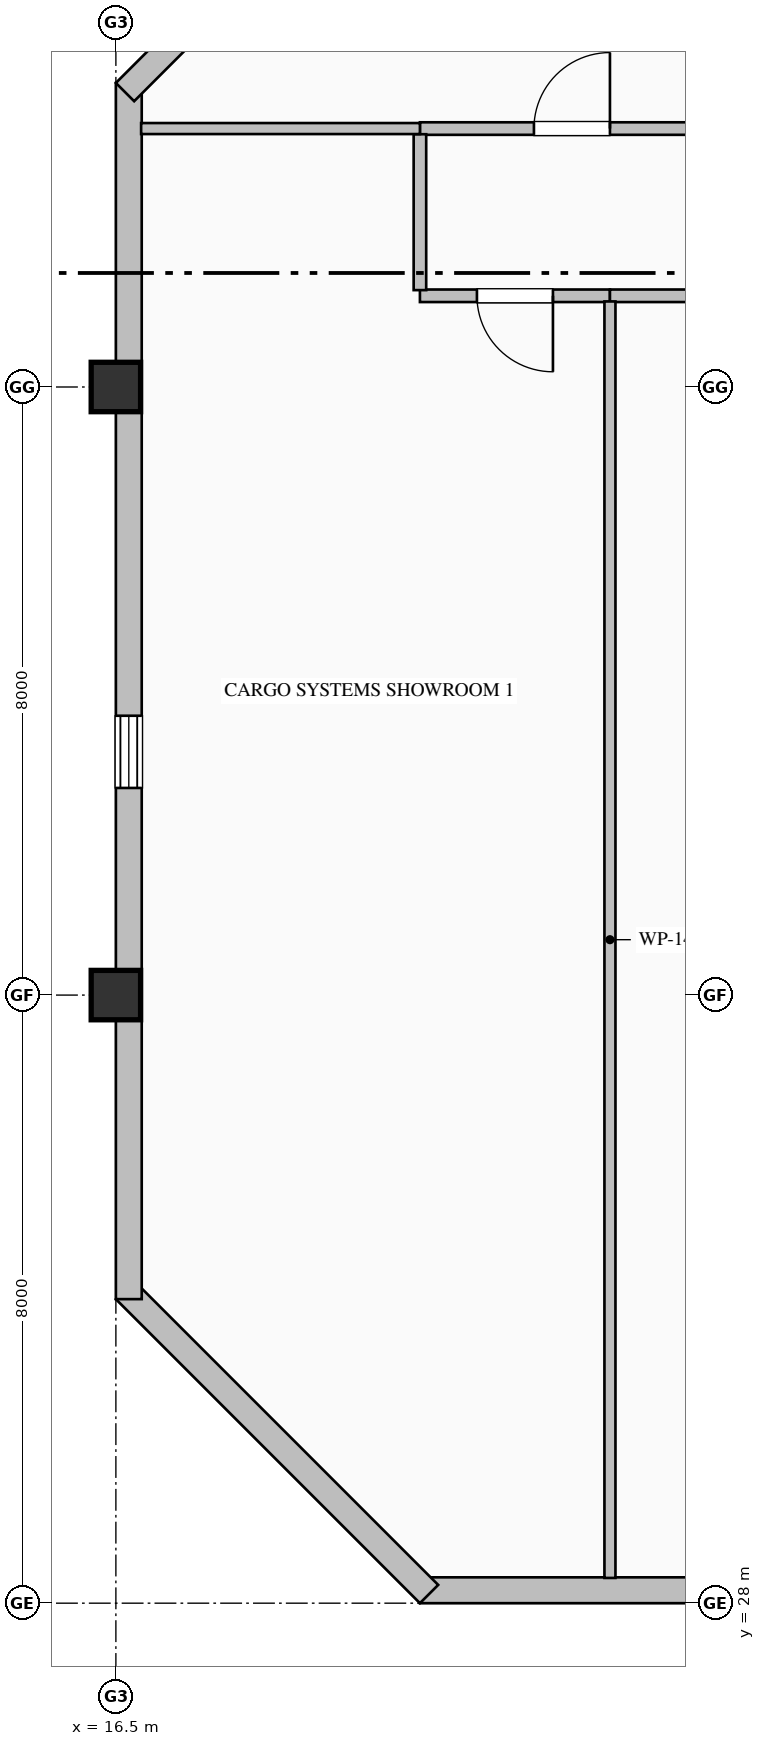
"""IFC4 building model, lengths in metres.
Left out: names, types, materials, properties, quantities, classifications, styles, units other than length and angle.
Written with IfcOpenShell. Run it as: python <this file> out.ifc"""

import sys

from ifc_helpers import new_model, si_unit, direction, frame, frame_2d, origin, origin_2d, place, context, subcontext, project, spatial, rectangle, hollow_rectangle, extrude, element, fill, save


model = new_model("IFC4")
c1 = context("Model", 3, precision=1e-05, world=origin(), true_north=direction((0.0, 1.0)))
c2 = subcontext(c1, "Body", "Model", "MODEL_VIEW")
j1 = project(units=[si_unit("LENGTHUNIT", "METRE"), si_unit("PLANEANGLEUNIT", "RADIAN")], contexts=[c1])
p1 = place(None, origin())
s1 = spatial("IfcSite", under=j1, at=p1, CompositionType="ELEMENT")
p2 = place(p1, origin())
s2 = spatial("IfcBuilding", under=s1, at=p2, CompositionType="ELEMENT")
p3 = place(p2, frame((0.0, 0.0, 355.2)))
s3 = spatial("IfcBuildingStorey", under=s2, at=p3, CompositionType="ELEMENT", Elevation=355.2)
for number, where, z_axis, x_axis in (
    (1, (16.5, 36.0, 0.0), (0.0, 0.0, 1.0), (1.0, 0.0, 0.0)),
    (2, (16.5, 44.0, 0.0), (0.0, 0.0, 1.0), (1.0, 0.0, 0.0)),
):
    element("IfcColumn", number, at=place(p3, frame(where, z_axis=z_axis, x_axis=x_axis)), inside=s3, PredefinedType="COLUMN", context=c2, shape_type="SweptSolid", body=[
        extrude(hollow_rectangle(XDim=0.65, YDim=0.65, WallThickness=0.028, at=origin_2d()), origin(), (0.0, 0.0, 1.0), 4.0),
    ])
p4 = place(p3, frame((40.52, 28.17, 0.0), z_axis=(0.0, 0.0, 1.0), x_axis=(-1.0, 0.0, 0.0)))
e3 = element("IfcWall", 3, at=p4, inside=s3, PredefinedType="SOLIDWALL", context=c2, shape_type="SweptSolid", body=[
    extrude(rectangle(XDim=20.02, YDim=0.34, at=frame_2d((10.01, 0.0))), origin(), (0.0, 0.0, 1.0), 3.185),
])
p5 = place(p4, frame((3.125, 0.0, 0.9)))
e4 = element("IfcOpeningElement", 4, at=p5, cuts=e3, PredefinedType="OPENING", context=c2, shape_type="SweptSolid", body=[
    extrude(rectangle(XDim=0.95, YDim=1.85, at=frame_2d((0.475, 0.925))), frame((0.0, 0.18, 0.0), z_axis=(0.0, -1.0, 0.0), x_axis=(1.0, 0.0, 0.0)), (0.0, 0.0, 1.0), 0.36),
])
p6 = place(p4, frame((13.925, 0.0, 0.9)))
e5 = element("IfcOpeningElement", 5, at=p6, cuts=e3, PredefinedType="OPENING", context=c2, shape_type="SweptSolid", body=[
    extrude(rectangle(XDim=0.95, YDim=1.85, at=frame_2d((0.475, 0.925))), frame((0.0, 0.18, 0.0), z_axis=(0.0, -1.0, 0.0), x_axis=(1.0, 0.0, 0.0)), (0.0, 0.0, 1.0), 0.36),
])
p7 = place(p3, frame((20.62, 28.12, 0.0), z_axis=(0.0, 0.0, 1.0), x_axis=(-0.707106781187, 0.707106781187, 0.0)))
e6 = element("IfcWall", 6, at=p7, inside=s3, PredefinedType="SOLIDWALL", context=c2, shape_type="SweptSolid", body=[
    extrude(rectangle(XDim=5.657, YDim=0.34, at=frame_2d((2.828, 0.0))), origin(), (0.0, 0.0, 1.0), 3.785),
])
p8 = place(p3, frame((16.67, 32.0, 0.0), z_axis=(0.0, 0.0, 1.0), x_axis=(0.0, 1.0, 0.0)))
e7 = element("IfcWall", 7, at=p8, inside=s3, PredefinedType="SOLIDWALL", context=c2, shape_type="SweptSolid", body=[
    extrude(rectangle(XDim=16.0, YDim=0.34, at=frame_2d((8.0, 0.0))), origin(), (0.0, 0.0, 1.0), 3.335),
])
p9 = place(p8, frame((6.725, 0.0, 0.9)))
e8 = element("IfcOpeningElement", 8, at=p9, cuts=e7, PredefinedType="OPENING", context=c2, shape_type="SweptSolid", body=[
    extrude(rectangle(XDim=0.95, YDim=1.85, at=frame_2d((0.475, 0.925))), frame((0.0, 0.18, 0.0), z_axis=(0.0, -1.0, 0.0), x_axis=(1.0, 0.0, 0.0)), (0.0, 0.0, 1.0), 0.36),
])
p10 = place(p3, frame((16.62, 47.88, 0.0), z_axis=(0.0, 0.0, 1.0), x_axis=(0.707106781187, 0.707106781187, 0.0)))
e9 = element("IfcWall", 9, at=p10, inside=s3, PredefinedType="SOLIDWALL", context=c2, shape_type="SweptSolid", body=[
    extrude(rectangle(XDim=5.657, YDim=0.34, at=frame_2d((2.828, 0.0))), origin(), (0.0, 0.0, 1.0), 3.785),
])
p11 = place(p3, frame((20.5, 47.4, 0.0), z_axis=(0.0, 0.0, 1.0), x_axis=(1.0, 0.0, 0.0)))
e10 = element("IfcWall", 10, at=p11, inside=s3, PredefinedType="PARTITIONING", context=c2, shape_type="SweptSolid", body=[
    extrude(rectangle(XDim=4.0, YDim=0.165, at=frame_2d((2.0, 0.0))), origin(), (0.0, 0.0, 1.0), 3.785),
])
p12 = place(p11, frame((1.5, 0.0, 0.0)))
e11 = element("IfcOpeningElement", 11, at=p12, cuts=e10, PredefinedType="OPENING", context=c2, shape_type="SweptSolid", body=[
    extrude(rectangle(XDim=1.0, YDim=2.15, at=frame_2d((0.5, 1.075))), frame((0.0, 0.093, 0.0), z_axis=(0.0, -1.0, 0.0), x_axis=(1.0, 0.0, 0.0)), (0.0, 0.0, 1.0), 0.185),
])
p13 = place(p3, frame((23.0, 45.2, 0.0), z_axis=(0.0, 0.0, 1.0), x_axis=(-1.0, 0.0, 0.0)))
e12 = element("IfcWall", 12, at=p13, inside=s3, PredefinedType="PARTITIONING", context=c2, shape_type="SweptSolid", body=[
    extrude(rectangle(XDim=2.5, YDim=0.165, at=frame_2d((1.25, 0.0))), origin(), (0.0, 0.0, 1.0), 3.785),
])
p14 = place(p13, frame((0.75, 0.0, 0.0)))
e13 = element("IfcOpeningElement", 13, at=p14, cuts=e12, PredefinedType="OPENING", context=c2, shape_type="SweptSolid", body=[
    extrude(rectangle(XDim=1.0, YDim=2.15, at=frame_2d((0.5, 1.075))), frame((0.0, 0.093, 0.0), z_axis=(0.0, -1.0, 0.0), x_axis=(1.0, 0.0, 0.0)), (0.0, 0.0, 1.0), 0.185),
])
p15 = place(p3, frame((20.5, 45.274, 0.0), z_axis=(0.0, 0.0, 1.0), x_axis=(0.0, 1.0, 0.0)))
e14 = element("IfcWall", 14, at=p15, inside=s3, PredefinedType="PARTITIONING", context=c2, shape_type="SweptSolid", body=[
    extrude(rectangle(XDim=2.051, YDim=0.165, at=frame_2d((1.025, 0.0))), origin(), (0.0, 0.0, 1.0), 3.785),
])
p16 = place(p3, frame((30.2, 45.2, 0.0), z_axis=(0.0, 0.0, 1.0), x_axis=(-1.0, 0.0, 0.0)))
e15 = element("IfcWall", 15, at=p16, inside=s3, PredefinedType="PARTITIONING", context=c2, shape_type="SweptSolid", body=[
    extrude(rectangle(XDim=7.2, YDim=0.165, at=frame_2d((3.6, 0.0))), origin(), (0.0, 0.0, 1.0), 3.785),
])
p17 = place(p16, frame((3.1, 0.0, 0.0)))
e16 = element("IfcOpeningElement", 16, at=p17, cuts=e15, PredefinedType="OPENING", context=c2, shape_type="SweptSolid", body=[
    extrude(rectangle(XDim=1.0, YDim=2.15, at=frame_2d((0.5, 1.075))), frame((0.0, 0.093, 0.0), z_axis=(0.0, -1.0, 0.0), x_axis=(1.0, 0.0, 0.0)), (0.0, 0.0, 1.0), 0.185),
])
p18 = place(p3, frame((20.5, 47.4, 0.0), z_axis=(0.0, 0.0, 1.0), x_axis=(-1.0, 0.0, 0.0)))
e17 = element("IfcWall", 17, at=p18, inside=s3, PredefinedType="PARTITIONING", context=c2, shape_type="SweptSolid", body=[
    extrude(rectangle(XDim=3.668, YDim=0.145, at=frame_2d((1.834, 0.0))), origin(), (0.0, 0.0, 1.0), 3.785),
])
p19 = place(p3, frame((23.0, 45.125, 0.0), z_axis=(0.0, 0.0, 1.0), x_axis=(0.0, -1.0, 0.0)))
e18 = element("IfcWall", 18, at=p19, inside=s3, PredefinedType="PARTITIONING", context=c2, shape_type="SweptSolid", body=[
    extrude(rectangle(XDim=16.793, YDim=0.145, at=frame_2d((8.397, 0.0))), origin(), (0.0, 0.0, 1.0), 3.785),
])
p20 = place(p9, origin())
e19 = element("IfcWindow", 19, at=p20, inside=s3, PartitioningType="SINGLE_PANEL", PredefinedType="WINDOW", context=c2, shape_type="SweptSolid", body=[
    extrude(rectangle(XDim=0.95, YDim=1.85, at=frame_2d((0.475, 0.925))), frame((0.0, 0.15, 0.0), z_axis=(0.0, -1.0, 0.0), x_axis=(1.0, 0.0, 0.0)), (0.0, 0.0, 1.0), 0.06),
])
fill(e8, e19)
p21 = place(p12, origin())
e20 = element("IfcDoor", 20, at=p21, inside=s3, OperationType="SINGLE_SWING_RIGHT", PredefinedType="DOOR", context=c2, shape_type="SweptSolid", body=[
    extrude(rectangle(XDim=1.0, YDim=2.15, at=frame_2d((0.5, 1.075))), frame((0.0, 0.025, 0.0), z_axis=(0.0, -1.0, 0.0), x_axis=(1.0, 0.0, 0.0)), (0.0, 0.0, 1.0), 0.05),
])
fill(e11, e20)
p22 = place(p14, origin())
e21 = element("IfcDoor", 21, at=p22, inside=s3, OperationType="SINGLE_SWING_LEFT", PredefinedType="DOOR", context=c2, shape_type="SweptSolid", body=[
    extrude(rectangle(XDim=1.0, YDim=2.15, at=frame_2d((0.5, 1.075))), frame((0.0, 0.025, 0.0), z_axis=(0.0, -1.0, 0.0), x_axis=(1.0, 0.0, 0.0)), (0.0, 0.0, 1.0), 0.05),
])
fill(e13, e21)
save(model, sys.argv[1])
